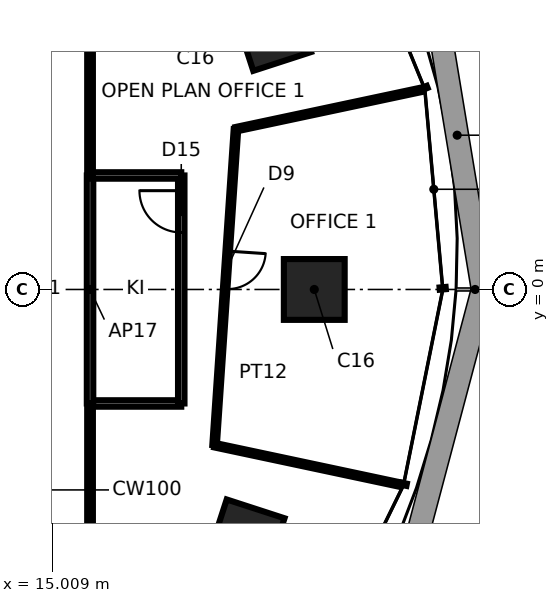
"""IFC4 building model, lengths in metres.
Left out: names, types, materials, properties, quantities, classifications, styles, units other than length and angle.
Written with IfcOpenShell. Run it as: python <this file> out.ifc"""

import sys

from ifc_helpers import new_model, si_unit, direction, frame, frame_2d, origin, origin_2d, place, context, subcontext, project, spatial, rectangle, extrude, element, fill, save


model = new_model("IFC4")
c1 = context("Model", 3, precision=1e-05, world=origin(), true_north=direction((0.0, 1.0)))
c2 = subcontext(c1, "Body", "Model", "MODEL_VIEW")
j1 = project(units=[si_unit("LENGTHUNIT", "METRE"), si_unit("PLANEANGLEUNIT", "RADIAN")], contexts=[c1])
p1 = place(None, origin())
s1 = spatial("IfcSite", under=j1, at=p1, CompositionType="ELEMENT")
p2 = place(p1, origin())
s2 = spatial("IfcBuilding", under=s1, at=p2, CompositionType="ELEMENT")
p3 = place(p2, frame((0.0, 0.0, 115.8)))
s3 = spatial("IfcBuildingStorey", under=s2, at=p3, CompositionType="ELEMENT", Elevation=115.8)
for number, where, z_axis, x_axis in (
    (1, (21.9, 0.0, 0.0), (0.0, 0.0, 1.0), (1.0, 0.0, 0.0)),
    (2, (20.808, 6.761, 0.0), (0.0, 0.0, 1.0), (0.951, 0.309, 0.0)),
    (3, (20.109, -6.534, 0.0), (0.0, 0.0, 1.0), (0.951, -0.309, 0.0)),
):
    element("IfcColumn", number, at=place(p3, frame(where, z_axis=z_axis, x_axis=x_axis)), inside=s3, PredefinedType="COLUMN", context=c2, shape_type="SweptSolid", body=[
        extrude(rectangle(XDim=1.6, YDim=1.6, at=origin_2d()), origin(), (0.0, 0.0, 1.0), 3.9),
    ])
p4 = place(p3, frame((16.0, -11.3, 0.0), z_axis=(0.0, 0.0, 1.0), x_axis=(0.0, 1.0, 0.0)))
e4 = element("IfcWall", 4, at=p4, inside=s3, PredefinedType="PARTITIONING", context=c2, shape_type="SweptSolid", body=[
    extrude(rectangle(XDim=8.3, YDim=0.15, at=frame_2d((4.15, 0.0))), origin(), (0.0, 0.0, 1.0), 3.74),
])
p5 = place(p3, frame((19.277, -4.097, 0.0), z_axis=(0.0, 0.0, 1.0), x_axis=(0.978149046495, -0.207904888932, 0.0)))
e5 = element("IfcWall", 5, at=p5, inside=s3, PredefinedType="PARTITIONING", context=c2, shape_type="SweptSolid", body=[
    extrude(rectangle(XDim=5.0, YDim=0.12, at=frame_2d((2.5, 0.0))), origin(), (0.0, 0.0, 1.0), 3.74),
])
p6 = place(p3, frame((16.0, -3.0, 0.0), z_axis=(0.0, 0.0, 1.0), x_axis=(1.0, 0.0, 0.0)))
e6 = element("IfcWall", 6, at=p6, inside=s3, PredefinedType="PARTITIONING", context=c2, shape_type="SweptSolid", body=[
    extrude(rectangle(XDim=2.4, YDim=0.17, at=frame_2d((1.2, 0.0))), origin(), (0.0, 0.0, 1.0), 3.74),
])
p7 = place(p3, frame((16.0, 3.0, 0.0), z_axis=(0.0, 0.0, 1.0), x_axis=(0.0, -1.0, 0.0)))
e7 = element("IfcWall", 7, at=p7, inside=s3, PredefinedType="PARTITIONING", context=c2, shape_type="SweptSolid", body=[
    extrude(rectangle(XDim=6.0, YDim=0.17, at=frame_2d((3.0, 0.0))), origin(), (0.0, 0.0, 1.0), 3.74),
])
p8 = place(p3, frame((18.4, -3.0, 0.0), z_axis=(0.0, 0.0, 1.0), x_axis=(0.0, 1.0, 0.0)))
e8 = element("IfcWall", 8, at=p8, inside=s3, PredefinedType="PARTITIONING", context=c2, shape_type="SweptSolid", body=[
    extrude(rectangle(XDim=6.0, YDim=0.17, at=frame_2d((3.0, 0.0))), origin(), (0.0, 0.0, 1.0), 3.74),
])
p9 = place(p8, frame((4.5, 0.0, 0.0)))
e9 = element("IfcOpeningElement", 9, at=p9, cuts=e8, PredefinedType="OPENING", context=c2, shape_type="SweptSolid", body=[
    extrude(rectangle(XDim=1.1, YDim=2.4, at=frame_2d((0.55, 1.2))), frame((0.0, 0.095, 0.0), z_axis=(0.0, -1.0, 0.0), x_axis=(1.0, 0.0, 0.0)), (0.0, 0.0, 1.0), 0.19),
])
p10 = place(p3, frame((19.84, 4.217, 0.0), z_axis=(0.0, 0.0, 1.0), x_axis=(-0.067498983032, -0.997719342947, 0.0)))
e10 = element("IfcWall", 10, at=p10, inside=s3, PredefinedType="PARTITIONING", context=c2, shape_type="SweptSolid", body=[
    extrude(rectangle(XDim=8.333, YDim=0.12, at=frame_2d((4.167, 0.0))), origin(), (0.0, 0.0, 1.0), 3.74),
])
p11 = place(p10, frame((3.214, 0.0, 0.0)))
e11 = element("IfcOpeningElement", 11, at=p11, cuts=e10, PredefinedType="OPENING", context=c2, shape_type="SweptSolid", body=[
    extrude(rectangle(XDim=1.0, YDim=2.4, at=frame_2d((0.5, 1.2))), frame((0.0, 0.07, 0.0), z_axis=(0.0, -1.0, 0.0), x_axis=(1.0, 0.0, 0.0)), (0.0, 0.0, 1.0), 0.14),
])
p12 = place(p3, frame((18.4, 3.0, 0.0), z_axis=(0.0, 0.0, 1.0), x_axis=(-1.0, 0.0, 0.0)))
e12 = element("IfcWall", 12, at=p12, inside=s3, PredefinedType="PARTITIONING", context=c2, shape_type="SweptSolid", body=[
    extrude(rectangle(XDim=2.4, YDim=0.17, at=frame_2d((1.2, 0.0))), origin(), (0.0, 0.0, 1.0), 3.74),
])
p13 = place(p3, frame((24.73, 5.257, 0.0), z_axis=(0.0, 0.0, 1.0), x_axis=(-0.978149046495, -0.207904888932, 0.0)))
e13 = element("IfcWall", 13, at=p13, inside=s3, PredefinedType="PARTITIONING", context=c2, shape_type="SweptSolid", body=[
    extrude(rectangle(XDim=5.0, YDim=0.12, at=frame_2d((2.5, 0.0))), origin(), (0.0, 0.0, 1.0), 3.74),
])
p14 = place(p3, frame((16.0, 3.0, 0.0), z_axis=(0.0, 0.0, 1.0), x_axis=(0.0, 1.0, 0.0)))
e14 = element("IfcWall", 14, at=p14, inside=s3, PredefinedType="PARTITIONING", context=c2, shape_type="SweptSolid", body=[
    extrude(rectangle(XDim=8.3, YDim=0.15, at=frame_2d((4.15, 0.0))), origin(), (0.0, 0.0, 1.0), 3.74),
])
p15 = place(p11, origin())
e15 = element("IfcDoor", 15, at=p15, inside=s3, OperationType="SINGLE_SWING_LEFT", PredefinedType="DOOR", context=c2, shape_type="SweptSolid", body=[
    extrude(rectangle(XDim=1.0, YDim=2.4, at=frame_2d((0.5, 1.2))), frame((0.0, 0.025, 0.0), z_axis=(0.0, -1.0, 0.0), x_axis=(1.0, 0.0, 0.0)), (0.0, 0.0, 1.0), 0.05),
])
fill(e11, e15)
p16 = place(p9, origin())
e16 = element("IfcDoor", 16, at=p16, inside=s3, OperationType="SINGLE_SWING_RIGHT", PredefinedType="DOOR", context=c2, shape_type="SweptSolid", body=[
    extrude(rectangle(XDim=1.1, YDim=2.4, at=frame_2d((0.55, 1.2))), frame((0.0, 0.025, 0.0), z_axis=(0.0, -1.0, 0.0), x_axis=(1.0, 0.0, 0.0)), (0.0, 0.0, 1.0), 0.05),
])
fill(e9, e16)
save(model, sys.argv[1])
